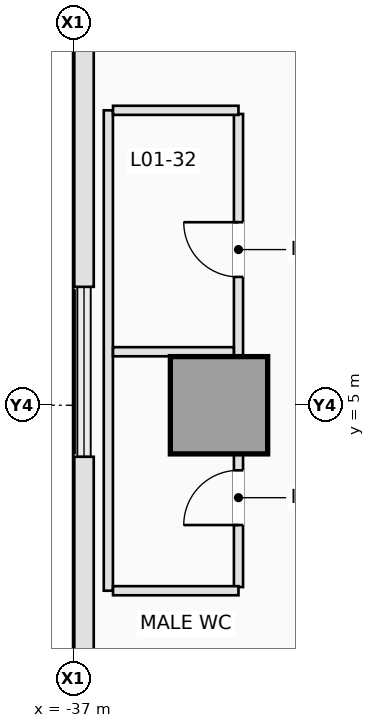
"""IFC4 building model, lengths in metres.
Left out: names, types, materials, properties, quantities, classifications, styles, units other than length and angle.
Written with IfcOpenShell. Run it as: python <this file> out.ifc"""

import sys

from ifc_helpers import new_model, si_unit, direction, frame, frame_2d, origin, origin_2d, place, context, subcontext, project, spatial, rectangle, extrude, element, fill, save


model = new_model("IFC4")
c1 = context("Model", 3, precision=1e-05, world=origin(), true_north=direction((0.0, 1.0)))
c2 = subcontext(c1, "Body", "Model", "MODEL_VIEW")
j1 = project(units=[si_unit("LENGTHUNIT", "METRE"), si_unit("PLANEANGLEUNIT", "RADIAN")], contexts=[c1])
p1 = place(None, origin())
s1 = spatial("IfcSite", under=j1, at=p1, CompositionType="ELEMENT")
p2 = place(p1, origin())
s2 = spatial("IfcBuilding", under=s1, at=p2, CompositionType="ELEMENT")
p3 = place(p2, frame((0.0, 0.0, 5.0)))
s3 = spatial("IfcBuildingStorey", under=s2, at=p3, CompositionType="ELEMENT", Elevation=5.0)
p4 = place(p3, frame((-34.6, 5.0, 0.0), z_axis=(0.0, 0.0, 1.0), x_axis=(1.0, 0.0, 0.0)))
e1 = element("IfcColumn", 1, at=p4, inside=s3, PredefinedType="COLUMN", context=c2, shape_type="SweptSolid", body=[
    extrude(rectangle(XDim=1.6, YDim=1.6, at=origin_2d()), origin(), (0.0, 0.0, 1.0), 4.5),
])
p5 = place(p3, frame((-36.82, -4.153, 0.0), z_axis=(0.0, 0.0, 1.0), x_axis=(0.0, 1.0, 0.0)))
e2 = element("IfcWall", 2, at=p5, inside=s3, PredefinedType="STANDARD", context=c2, shape_type="SweptSolid", body=[
    extrude(rectangle(XDim=8.305, YDim=0.32, at=frame_2d((4.153, 0.0))), origin(), (0.0, 0.0, 1.0), 4.2),
])
p6 = place(p3, frame((-36.82, 6.947, 0.0), z_axis=(0.0, 0.0, 1.0), x_axis=(0.0, 1.0, 0.0)))
e3 = element("IfcWall", 3, at=p6, inside=s3, PredefinedType="STANDARD", context=c2, shape_type="SweptSolid", body=[
    extrude(rectangle(XDim=8.305, YDim=0.32, at=frame_2d((4.153, 0.0))), origin(), (0.0, 0.0, 1.0), 4.2),
])
p7 = place(p3, frame((-36.42, 1.95, 0.0), z_axis=(0.0, 0.0, 1.0), x_axis=(0.0, 1.0, 0.0)))
e4 = element("IfcWall", 4, at=p7, inside=s3, PredefinedType="PARTITIONING", context=c2, shape_type="SweptSolid", body=[
    extrude(rectangle(XDim=7.9, YDim=0.15, at=frame_2d((3.95, 0.0))), origin(), (0.0, 0.0, 1.0), 4.2),
])
p8 = place(p3, frame((-34.28, 2.01, 0.0), z_axis=(0.0, 0.0, 1.0), x_axis=(0.0, 1.0, 0.0)))
e5 = element("IfcWall", 5, at=p8, inside=s3, PredefinedType="PARTITIONING", context=c2, shape_type="SweptSolid", body=[
    extrude(rectangle(XDim=2.188, YDim=0.15, at=frame_2d((1.094, 0.0))), origin(), (0.0, 0.0, 1.0), 4.2),
])
p9 = place(p8, frame((1.02, 0.0, 0.0)))
e6 = element("IfcOpeningElement", 6, at=p9, cuts=e5, PredefinedType="OPENING", context=c2, shape_type="SweptSolid", body=[
    extrude(rectangle(XDim=0.9, YDim=2.12, at=frame_2d((0.45, 1.06))), frame((0.0, 0.085, 0.0), z_axis=(0.0, -1.0, 0.0), x_axis=(1.0, 0.0, 0.0)), (0.0, 0.0, 1.0), 0.17),
])
p10 = place(p3, frame((-34.28, 5.802, 0.0), z_axis=(0.0, 0.0, 1.0), x_axis=(0.0, 1.0, 0.0)))
e7 = element("IfcWall", 7, at=p10, inside=s3, PredefinedType="PARTITIONING", context=c2, shape_type="SweptSolid", body=[
    extrude(rectangle(XDim=3.988, YDim=0.15, at=frame_2d((1.994, 0.0))), origin(), (0.0, 0.0, 1.0), 4.2),
])
p11 = place(p10, frame((1.308, 0.0, 0.0)))
e8 = element("IfcOpeningElement", 8, at=p11, cuts=e7, PredefinedType="OPENING", context=c2, shape_type="SweptSolid", body=[
    extrude(rectangle(XDim=0.9, YDim=2.12, at=frame_2d((0.45, 1.06))), frame((0.0, 0.085, 0.0), z_axis=(0.0, -1.0, 0.0), x_axis=(1.0, 0.0, 0.0)), (0.0, 0.0, 1.0), 0.17),
])
p12 = place(p3, frame((-36.343, 5.88, 0.0), z_axis=(0.0, 0.0, 1.0), x_axis=(1.0, 0.0, 0.0)))
e9 = element("IfcWall", 9, at=p12, inside=s3, PredefinedType="PARTITIONING", context=c2, shape_type="SweptSolid", body=[
    extrude(rectangle(XDim=1.986, YDim=0.15, at=frame_2d((0.993, 0.0))), origin(), (0.0, 0.0, 1.0), 4.2),
])
for number, where, z_axis, x_axis in (
    (10, (-36.343, 1.95, 0.0), (0.0, 0.0, 1.0), (1.0, 0.0, 0.0)),
    (11, (-36.343, 9.85, 0.0), (0.0, 0.0, 1.0), (1.0, 0.0, 0.0)),
):
    element("IfcWall", number, at=place(p3, frame(where, z_axis=z_axis, x_axis=x_axis)), inside=s3, PredefinedType="PARTITIONING", context=c2, shape_type="SweptSolid", body=[
        extrude(rectangle(XDim=2.063, YDim=0.15, at=frame_2d((1.031, 0.0))), origin(), (0.0, 0.0, 1.0), 4.2),
    ])
p13 = place(p9, origin())
e12 = element("IfcDoor", 12, at=p13, inside=s3, OperationType="SINGLE_SWING_LEFT", PredefinedType="DOOR", context=c2, shape_type="SweptSolid", body=[
    extrude(rectangle(XDim=0.9, YDim=2.12, at=frame_2d((0.45, 1.06))), frame((0.0, 0.025, 0.0), z_axis=(0.0, -1.0, 0.0), x_axis=(1.0, 0.0, 0.0)), (0.0, 0.0, 1.0), 0.05),
])
fill(e6, e12)
p14 = place(p11, origin())
e13 = element("IfcDoor", 13, at=p14, inside=s3, OperationType="SINGLE_SWING_RIGHT", PredefinedType="DOOR", context=c2, shape_type="SweptSolid", body=[
    extrude(rectangle(XDim=0.9, YDim=2.12, at=frame_2d((0.45, 1.06))), frame((0.0, 0.025, 0.0), z_axis=(0.0, -1.0, 0.0), x_axis=(1.0, 0.0, 0.0)), (0.0, 0.0, 1.0), 0.05),
])
fill(e8, e13)
save(model, sys.argv[1])
